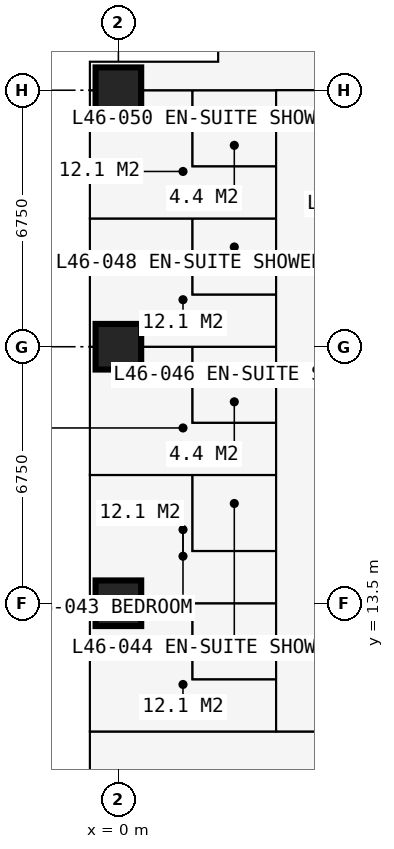
"""IFC4 building model, lengths in metres.
Left out: names, types, materials, properties, quantities, classifications, styles, units other than length and angle.
Written with IfcOpenShell. Run it as: python <this file> out.ifc"""

import sys

from ifc_helpers import new_model, si_unit, direction, frame, frame_2d, origin, origin_2d, place, context, subcontext, project, spatial, rectangle, extrude, element, fill, save


model = new_model("IFC4")
c1 = context("Model", 3, precision=1e-05, world=origin(), true_north=direction((0.0, 1.0)))
c2 = subcontext(c1, "Body", "Model", "MODEL_VIEW")
j1 = project(units=[si_unit("LENGTHUNIT", "METRE"), si_unit("PLANEANGLEUNIT", "RADIAN")], contexts=[c1])
p1 = place(None, origin())
s1 = spatial("IfcSite", under=j1, at=p1, CompositionType="ELEMENT")
p2 = place(p1, origin())
s2 = spatial("IfcBuilding", under=s1, at=p2, CompositionType="ELEMENT")
p3 = place(p2, frame((0.0, 0.0, 171.0)))
s3 = spatial("IfcBuildingStorey", under=s2, at=p3, CompositionType="ELEMENT", Elevation=171.0)
for number, where, z_axis, x_axis in (
    (1, (0.0, 13.5, 0.0), (0.0, 0.0, 1.0), (1.0, 0.0, 0.0)),
    (2, (0.0, 20.25, 0.0), (0.0, 0.0, 1.0), (1.0, 0.0, 0.0)),
    (3, (0.0, 27.0, 0.0), (0.0, 0.0, 1.0), (1.0, 0.0, 0.0)),
):
    element("IfcColumn", number, at=place(p3, frame(where, z_axis=z_axis, x_axis=x_axis)), inside=s3, PredefinedType="COLUMN", context=c2, shape_type="SweptSolid", body=[
        extrude(rectangle(XDim=1.2, YDim=1.2, at=origin_2d()), origin(), (0.0, 0.0, 1.0), 3.6),
    ])
p4 = place(p3, frame((2.625, 31.125, 0.0), z_axis=(0.0, 0.0, 1.0), x_axis=(0.0, -1.0, 0.0)))
e4 = element("IfcWall", 4, at=p4, inside=s3, PredefinedType="SOLIDWALL", context=c2, shape_type="SweptSolid", body=[
    extrude(rectangle(XDim=3.375, YDim=0.3, at=frame_2d((1.688, 0.0))), origin(), (0.0, 0.0, 1.0), 3.375),
])
p5 = place(p4, frame((0.788, 0.0, 0.6)))
e5 = element("IfcOpeningElement", 5, at=p5, cuts=e4, PredefinedType="OPENING", context=c2, shape_type="SweptSolid", body=[
    extrude(rectangle(XDim=1.8, YDim=2.1, at=frame_2d((0.9, 1.05))), frame((0.0, 0.16, 0.0), z_axis=(0.0, -1.0, 0.0), x_axis=(1.0, 0.0, 0.0)), (0.0, 0.0, 1.0), 0.32),
])
p6 = place(p3, frame((2.625, 27.75, 0.0), z_axis=(0.0, 0.0, 1.0), x_axis=(-1.0, 0.0, 0.0)))
e6 = element("IfcWall", 6, at=p6, inside=s3, PredefinedType="SOLIDWALL", context=c2, shape_type="SweptSolid", body=[
    extrude(rectangle(XDim=3.375, YDim=0.3, at=frame_2d((1.688, 0.0))), origin(), (0.0, 0.0, 1.0), 3.375),
])
p7 = place(p6, frame((0.788, 0.0, 0.6)))
e7 = element("IfcOpeningElement", 7, at=p7, cuts=e6, PredefinedType="OPENING", context=c2, shape_type="SweptSolid", body=[
    extrude(rectangle(XDim=1.8, YDim=2.1, at=frame_2d((0.9, 1.05))), frame((0.0, 0.16, 0.0), z_axis=(0.0, -1.0, 0.0), x_axis=(1.0, 0.0, 0.0)), (0.0, 0.0, 1.0), 0.32),
])
p8 = place(p3, frame((-0.75, 13.5, 0.0), z_axis=(0.0, 0.0, 1.0), x_axis=(0.0, 1.0, 0.0)))
e8 = element("IfcWall", 8, at=p8, inside=s3, PredefinedType="SOLIDWALL", context=c2, shape_type="SweptSolid", body=[
    extrude(rectangle(XDim=6.75, YDim=0.15, at=frame_2d((3.375, 0.0))), origin(), (0.0, 0.0, 1.0), 3.375),
])
p9 = place(p8, frame((0.613, 0.0, 0.0)))
e9 = element("IfcOpeningElement", 9, at=p9, cuts=e8, PredefinedType="OPENING", context=c2, shape_type="SweptSolid", body=[
    extrude(rectangle(XDim=1.0, YDim=2.2, at=frame_2d((0.5, 1.1))), frame((0.0, 0.085, 0.0), z_axis=(0.0, -1.0, 0.0), x_axis=(1.0, 0.0, 0.0)), (0.0, 0.0, 1.0), 0.17),
])
p10 = place(p8, frame((1.725, 0.0, 0.9)))
e10 = element("IfcOpeningElement", 10, at=p10, cuts=e8, PredefinedType="OPENING", context=c2, shape_type="SweptSolid", body=[
    extrude(rectangle(XDim=1.2, YDim=1.8, at=frame_2d((0.6, 0.9))), frame((0.0, 0.085, 0.0), z_axis=(0.0, -1.0, 0.0), x_axis=(1.0, 0.0, 0.0)), (0.0, 0.0, 1.0), 0.17),
])
p11 = place(p8, frame((5.137, 0.0, 0.0)))
e11 = element("IfcOpeningElement", 11, at=p11, cuts=e8, PredefinedType="OPENING", context=c2, shape_type="SweptSolid", body=[
    extrude(rectangle(XDim=1.0, YDim=2.2, at=frame_2d((0.5, 1.1))), frame((0.0, 0.085, 0.0), z_axis=(0.0, -1.0, 0.0), x_axis=(1.0, 0.0, 0.0)), (0.0, 0.0, 1.0), 0.17),
])
p12 = place(p8, frame((3.825, 0.0, 0.9)))
e12 = element("IfcOpeningElement", 12, at=p12, cuts=e8, PredefinedType="OPENING", context=c2, shape_type="SweptSolid", body=[
    extrude(rectangle(XDim=1.2, YDim=1.8, at=frame_2d((0.6, 0.9))), frame((0.0, 0.085, 0.0), z_axis=(0.0, -1.0, 0.0), x_axis=(1.0, 0.0, 0.0)), (0.0, 0.0, 1.0), 0.17),
])
p13 = place(p3, frame((-0.85, 16.875, 0.0), z_axis=(0.0, 0.0, 1.0), x_axis=(-1.0, 0.0, 0.0)))
e13 = element("IfcWall", 13, at=p13, inside=s3, PredefinedType="USERDEFINED", context=c2, shape_type="SweptSolid", body=[
    extrude(rectangle(XDim=2.2, YDim=1.0, at=frame_2d((1.1, 0.0))), origin(), (0.0, 0.0, 1.0), 0.9),
])
p14 = place(p3, frame((-0.734, 10.125, 0.0), z_axis=(0.0, 0.0, 1.0), x_axis=(1.0, 0.0, 0.0)))
e14 = element("IfcWall", 14, at=p14, inside=s3, PredefinedType="PARTITIONING", context=c2, shape_type="SweptSolid", body=[
    extrude(rectangle(XDim=10.859, YDim=0.15, at=frame_2d((5.429, 0.0))), origin(), (0.0, 0.0, 1.0), 3.375),
])
p15 = place(p14, frame((8.234, 0.0, 0.0)))
e15 = element("IfcOpeningElement", 15, at=p15, cuts=e14, PredefinedType="OPENING", context=c2, shape_type="SweptSolid", body=[
    extrude(rectangle(XDim=0.95, YDim=2.2, at=frame_2d((0.475, 1.1))), frame((0.0, 0.085, 0.0), z_axis=(0.0, -1.0, 0.0), x_axis=(1.0, 0.0, 0.0)), (0.0, 0.0, 1.0), 0.17),
])
p16 = place(p3, frame((-0.734, 13.5, 0.0), z_axis=(0.0, 0.0, 1.0), x_axis=(1.0, 0.0, 0.0)))
e16 = element("IfcWall", 16, at=p16, inside=s3, PredefinedType="PARTITIONING", context=c2, shape_type="SweptSolid", body=[
    extrude(rectangle(XDim=4.884, YDim=0.175, at=frame_2d((2.442, 0.0))), origin(), (0.0, 0.0, 1.0), 2.877),
])
p17 = place(p3, frame((-0.734, 16.875, 0.0), z_axis=(0.0, 0.0, 1.0), x_axis=(1.0, 0.0, 0.0)))
e17 = element("IfcWall", 17, at=p17, inside=s3, PredefinedType="PARTITIONING", context=c2, shape_type="SweptSolid", body=[
    extrude(rectangle(XDim=4.884, YDim=0.175, at=frame_2d((2.442, 0.0))), origin(), (0.0, 0.0, 1.0), 3.375),
])
p18 = place(p3, frame((-0.734, 20.25, 0.0), z_axis=(0.0, 0.0, 1.0), x_axis=(1.0, 0.0, 0.0)))
e18 = element("IfcWall", 18, at=p18, inside=s3, PredefinedType="PARTITIONING", context=c2, shape_type="SweptSolid", body=[
    extrude(rectangle(XDim=4.884, YDim=0.175, at=frame_2d((2.442, 0.0))), origin(), (0.0, 0.0, 1.0), 2.877),
])
p19 = place(p3, frame((-0.734, 23.625, 0.0), z_axis=(0.0, 0.0, 1.0), x_axis=(1.0, 0.0, 0.0)))
e19 = element("IfcWall", 19, at=p19, inside=s3, PredefinedType="PARTITIONING", context=c2, shape_type="SweptSolid", body=[
    extrude(rectangle(XDim=4.884, YDim=0.175, at=frame_2d((2.442, 0.0))), origin(), (0.0, 0.0, 1.0), 3.375),
])
p20 = place(p3, frame((-0.734, 27.0, 0.0), z_axis=(0.0, 0.0, 1.0), x_axis=(1.0, 0.0, 0.0)))
e20 = element("IfcWall", 20, at=p20, inside=s3, PredefinedType="PARTITIONING", context=c2, shape_type="SweptSolid", body=[
    extrude(rectangle(XDim=12.034, YDim=0.15, at=frame_2d((6.017, 0.0))), origin(), (0.0, 0.0, 1.0), 2.806),
])
p21 = place(p20, frame((8.084, 0.0, 0.0)))
e21 = element("IfcOpeningElement", 21, at=p21, cuts=e20, PredefinedType="OPENING", context=c2, shape_type="SweptSolid", body=[
    extrude(rectangle(XDim=1.0, YDim=2.2, at=frame_2d((0.5, 1.1))), frame((0.0, 0.085, 0.0), z_axis=(0.0, -1.0, 0.0), x_axis=(1.0, 0.0, 0.0)), (0.0, 0.0, 1.0), 0.17),
])
p22 = place(p3, frame((1.95, 11.5, 0.0), z_axis=(0.0, 0.0, 1.0), x_axis=(0.0, 1.0, 0.0)))
e22 = element("IfcWall", 22, at=p22, inside=s3, PredefinedType="PARTITIONING", context=c2, shape_type="SweptSolid", body=[
    extrude(rectangle(XDim=2.0, YDim=0.1, at=frame_2d((1.0, 0.0))), origin(), (0.0, 0.0, 1.0), 3.375),
])
p23 = place(p3, frame((1.95, 11.5, 0.0), z_axis=(0.0, 0.0, 1.0), x_axis=(1.0, 0.0, 0.0)))
e23 = element("IfcWall", 23, at=p23, inside=s3, PredefinedType="PARTITIONING", context=c2, shape_type="SweptSolid", body=[
    extrude(rectangle(XDim=2.2, YDim=0.1, at=frame_2d((1.1, 0.0))), origin(), (0.0, 0.0, 1.0), 3.375),
])
p24 = place(p23, frame((0.65, 0.0, 0.0)))
e24 = element("IfcOpeningElement", 24, at=p24, cuts=e23, PredefinedType="OPENING", context=c2, shape_type="SweptSolid", body=[
    extrude(rectangle(XDim=0.9, YDim=2.2, at=frame_2d((0.45, 1.1))), frame((0.0, 0.06, 0.0), z_axis=(0.0, -1.0, 0.0), x_axis=(1.0, 0.0, 0.0)), (0.0, 0.0, 1.0), 0.12),
])
p25 = place(p3, frame((1.95, 14.875, 0.0), z_axis=(0.0, 0.0, 1.0), x_axis=(0.0, 1.0, 0.0)))
e25 = element("IfcWall", 25, at=p25, inside=s3, PredefinedType="PARTITIONING", context=c2, shape_type="SweptSolid", body=[
    extrude(rectangle(XDim=2.0, YDim=0.1, at=frame_2d((1.0, 0.0))), origin(), (0.0, 0.0, 1.0), 3.375),
])
p26 = place(p3, frame((1.95, 14.875, 0.0), z_axis=(0.0, 0.0, 1.0), x_axis=(1.0, 0.0, 0.0)))
e26 = element("IfcWall", 26, at=p26, inside=s3, PredefinedType="PARTITIONING", context=c2, shape_type="SweptSolid", body=[
    extrude(rectangle(XDim=2.2, YDim=0.1, at=frame_2d((1.1, 0.0))), origin(), (0.0, 0.0, 1.0), 3.375),
])
p27 = place(p26, frame((0.65, 0.0, 0.0)))
e27 = element("IfcOpeningElement", 27, at=p27, cuts=e26, PredefinedType="OPENING", context=c2, shape_type="SweptSolid", body=[
    extrude(rectangle(XDim=0.9, YDim=2.2, at=frame_2d((0.45, 1.1))), frame((0.0, 0.06, 0.0), z_axis=(0.0, -1.0, 0.0), x_axis=(1.0, 0.0, 0.0)), (0.0, 0.0, 1.0), 0.12),
])
p28 = place(p3, frame((1.95, 18.25, 0.0), z_axis=(0.0, 0.0, 1.0), x_axis=(0.0, 1.0, 0.0)))
e28 = element("IfcWall", 28, at=p28, inside=s3, PredefinedType="PARTITIONING", context=c2, shape_type="SweptSolid", body=[
    extrude(rectangle(XDim=2.0, YDim=0.1, at=frame_2d((1.0, 0.0))), origin(), (0.0, 0.0, 1.0), 3.375),
])
p29 = place(p3, frame((1.95, 18.25, 0.0), z_axis=(0.0, 0.0, 1.0), x_axis=(1.0, 0.0, 0.0)))
e29 = element("IfcWall", 29, at=p29, inside=s3, PredefinedType="PARTITIONING", context=c2, shape_type="SweptSolid", body=[
    extrude(rectangle(XDim=2.2, YDim=0.1, at=frame_2d((1.1, 0.0))), origin(), (0.0, 0.0, 1.0), 3.375),
])
p30 = place(p29, frame((0.65, 0.0, 0.0)))
e30 = element("IfcOpeningElement", 30, at=p30, cuts=e29, PredefinedType="OPENING", context=c2, shape_type="SweptSolid", body=[
    extrude(rectangle(XDim=0.9, YDim=2.2, at=frame_2d((0.45, 1.1))), frame((0.0, 0.06, 0.0), z_axis=(0.0, -1.0, 0.0), x_axis=(1.0, 0.0, 0.0)), (0.0, 0.0, 1.0), 0.12),
])
p31 = place(p3, frame((1.95, 21.625, 0.0), z_axis=(0.0, 0.0, 1.0), x_axis=(0.0, 1.0, 0.0)))
e31 = element("IfcWall", 31, at=p31, inside=s3, PredefinedType="PARTITIONING", context=c2, shape_type="SweptSolid", body=[
    extrude(rectangle(XDim=2.0, YDim=0.1, at=frame_2d((1.0, 0.0))), origin(), (0.0, 0.0, 1.0), 3.375),
])
p32 = place(p3, frame((1.95, 21.625, 0.0), z_axis=(0.0, 0.0, 1.0), x_axis=(1.0, 0.0, 0.0)))
e32 = element("IfcWall", 32, at=p32, inside=s3, PredefinedType="PARTITIONING", context=c2, shape_type="SweptSolid", body=[
    extrude(rectangle(XDim=2.2, YDim=0.1, at=frame_2d((1.1, 0.0))), origin(), (0.0, 0.0, 1.0), 3.375),
])
p33 = place(p32, frame((0.65, 0.0, 0.0)))
e33 = element("IfcOpeningElement", 33, at=p33, cuts=e32, PredefinedType="OPENING", context=c2, shape_type="SweptSolid", body=[
    extrude(rectangle(XDim=0.9, YDim=2.2, at=frame_2d((0.45, 1.1))), frame((0.0, 0.06, 0.0), z_axis=(0.0, -1.0, 0.0), x_axis=(1.0, 0.0, 0.0)), (0.0, 0.0, 1.0), 0.12),
])
p34 = place(p3, frame((1.95, 25.0, 0.0), z_axis=(0.0, 0.0, 1.0), x_axis=(0.0, 1.0, 0.0)))
e34 = element("IfcWall", 34, at=p34, inside=s3, PredefinedType="PARTITIONING", context=c2, shape_type="SweptSolid", body=[
    extrude(rectangle(XDim=2.0, YDim=0.1, at=frame_2d((1.0, 0.0))), origin(), (0.0, 0.0, 1.0), 3.375),
])
p35 = place(p3, frame((1.95, 25.0, 0.0), z_axis=(0.0, 0.0, 1.0), x_axis=(1.0, 0.0, 0.0)))
e35 = element("IfcWall", 35, at=p35, inside=s3, PredefinedType="PARTITIONING", context=c2, shape_type="SweptSolid", body=[
    extrude(rectangle(XDim=2.2, YDim=0.1, at=frame_2d((1.1, 0.0))), origin(), (0.0, 0.0, 1.0), 3.375),
])
p36 = place(p35, frame((0.65, 0.0, 0.0)))
e36 = element("IfcOpeningElement", 36, at=p36, cuts=e35, PredefinedType="OPENING", context=c2, shape_type="SweptSolid", body=[
    extrude(rectangle(XDim=0.9, YDim=2.2, at=frame_2d((0.45, 1.1))), frame((0.0, 0.06, 0.0), z_axis=(0.0, -1.0, 0.0), x_axis=(1.0, 0.0, 0.0)), (0.0, 0.0, 1.0), 0.12),
])
p37 = place(p3, frame((4.15, 10.125, 0.0), z_axis=(0.0, 0.0, 1.0), x_axis=(0.0, 1.0, 0.0)))
e37 = element("IfcWall", 37, at=p37, inside=s3, PredefinedType="PARTITIONING", context=c2, shape_type="SweptSolid", body=[
    extrude(rectangle(XDim=16.875, YDim=0.1, at=frame_2d((8.438, 0.0))), origin(), (0.0, 0.0, 1.0), 3.375),
])
p38 = place(p37, frame((0.2, 0.0, 0.0)))
e38 = element("IfcOpeningElement", 38, at=p38, cuts=e37, PredefinedType="OPENING", context=c2, shape_type="SweptSolid", body=[
    extrude(rectangle(XDim=0.95, YDim=2.2, at=frame_2d((0.475, 1.1))), frame((0.0, 0.06, 0.0), z_axis=(0.0, -1.0, 0.0), x_axis=(1.0, 0.0, 0.0)), (0.0, 0.0, 1.0), 0.12),
])
p39 = place(p37, frame((3.625, 0.0, 0.0)))
e39 = element("IfcOpeningElement", 39, at=p39, cuts=e37, PredefinedType="OPENING", context=c2, shape_type="SweptSolid", body=[
    extrude(rectangle(XDim=0.95, YDim=2.2, at=frame_2d((0.475, 1.1))), frame((0.0, 0.06, 0.0), z_axis=(0.0, -1.0, 0.0), x_axis=(1.0, 0.0, 0.0)), (0.0, 0.0, 1.0), 0.12),
])
p40 = place(p37, frame((7.0, 0.0, 0.0)))
e40 = element("IfcOpeningElement", 40, at=p40, cuts=e37, PredefinedType="OPENING", context=c2, shape_type="SweptSolid", body=[
    extrude(rectangle(XDim=0.95, YDim=2.2, at=frame_2d((0.475, 1.1))), frame((0.0, 0.06, 0.0), z_axis=(0.0, -1.0, 0.0), x_axis=(1.0, 0.0, 0.0)), (0.0, 0.0, 1.0), 0.12),
])
p41 = place(p37, frame((10.375, 0.0, 0.0)))
e41 = element("IfcOpeningElement", 41, at=p41, cuts=e37, PredefinedType="OPENING", context=c2, shape_type="SweptSolid", body=[
    extrude(rectangle(XDim=0.95, YDim=2.2, at=frame_2d((0.475, 1.1))), frame((0.0, 0.06, 0.0), z_axis=(0.0, -1.0, 0.0), x_axis=(1.0, 0.0, 0.0)), (0.0, 0.0, 1.0), 0.12),
])
p42 = place(p37, frame((13.75, 0.0, 0.0)))
e42 = element("IfcOpeningElement", 42, at=p42, cuts=e37, PredefinedType="OPENING", context=c2, shape_type="SweptSolid", body=[
    extrude(rectangle(XDim=0.95, YDim=2.2, at=frame_2d((0.475, 1.1))), frame((0.0, 0.06, 0.0), z_axis=(0.0, -1.0, 0.0), x_axis=(1.0, 0.0, 0.0)), (0.0, 0.0, 1.0), 0.12),
])
p43 = place(p7, origin())
e43 = element("IfcWindow", 43, at=p43, inside=s3, PartitioningType="SINGLE_PANEL", PredefinedType="WINDOW", context=c2, shape_type="SweptSolid", body=[
    extrude(rectangle(XDim=1.8, YDim=2.1, at=frame_2d((0.9, 1.05))), frame((0.0, 0.03, 0.0), z_axis=(0.0, -1.0, 0.0), x_axis=(1.0, 0.0, 0.0)), (0.0, 0.0, 1.0), 0.06),
])
fill(e7, e43)
p44 = place(p9, origin())
e44 = element("IfcDoor", 44, at=p44, inside=s3, OperationType="SINGLE_SWING_LEFT", PredefinedType="DOOR", context=c2, shape_type="SweptSolid", body=[
    extrude(rectangle(XDim=1.0, YDim=2.2, at=frame_2d((0.5, 1.1))), frame((0.0, 0.025, 0.0), z_axis=(0.0, -1.0, 0.0), x_axis=(1.0, 0.0, 0.0)), (0.0, 0.0, 1.0), 0.05),
])
fill(e9, e44)
p45 = place(p10, origin())
e45 = element("IfcWindow", 45, at=p45, inside=s3, PartitioningType="SINGLE_PANEL", PredefinedType="WINDOW", context=c2, shape_type="SweptSolid", body=[
    extrude(rectangle(XDim=1.2, YDim=1.8, at=frame_2d((0.6, 0.9))), frame((0.0, 0.03, 0.0), z_axis=(0.0, -1.0, 0.0), x_axis=(1.0, 0.0, 0.0)), (0.0, 0.0, 1.0), 0.06),
])
fill(e10, e45)
p46 = place(p11, origin())
e46 = element("IfcDoor", 46, at=p46, inside=s3, OperationType="SINGLE_SWING_RIGHT", PredefinedType="DOOR", context=c2, shape_type="SweptSolid", body=[
    extrude(rectangle(XDim=1.0, YDim=2.2, at=frame_2d((0.5, 1.1))), frame((0.0, 0.025, 0.0), z_axis=(0.0, -1.0, 0.0), x_axis=(1.0, 0.0, 0.0)), (0.0, 0.0, 1.0), 0.05),
])
fill(e11, e46)
p47 = place(p12, origin())
e47 = element("IfcWindow", 47, at=p47, inside=s3, PartitioningType="SINGLE_PANEL", PredefinedType="WINDOW", context=c2, shape_type="SweptSolid", body=[
    extrude(rectangle(XDim=1.2, YDim=1.8, at=frame_2d((0.6, 0.9))), frame((0.0, 0.03, 0.0), z_axis=(0.0, -1.0, 0.0), x_axis=(1.0, 0.0, 0.0)), (0.0, 0.0, 1.0), 0.06),
])
fill(e12, e47)
p48 = place(p38, origin())
e48 = element("IfcDoor", 48, at=p48, inside=s3, OperationType="SINGLE_SWING_LEFT", PredefinedType="DOOR", context=c2, shape_type="SweptSolid", body=[
    extrude(rectangle(XDim=0.95, YDim=2.2, at=frame_2d((0.475, 1.1))), frame((0.0, 0.025, 0.0), z_axis=(0.0, -1.0, 0.0), x_axis=(1.0, 0.0, 0.0)), (0.0, 0.0, 1.0), 0.05),
])
fill(e38, e48)
p49 = place(p24, origin())
e49 = element("IfcDoor", 49, at=p49, inside=s3, OperationType="SINGLE_SWING_RIGHT", PredefinedType="DOOR", context=c2, shape_type="SweptSolid", body=[
    extrude(rectangle(XDim=0.9, YDim=2.2, at=frame_2d((0.45, 1.1))), frame((0.0, 0.025, 0.0), z_axis=(0.0, -1.0, 0.0), x_axis=(1.0, 0.0, 0.0)), (0.0, 0.0, 1.0), 0.05),
])
fill(e24, e49)
p50 = place(p39, origin())
e50 = element("IfcDoor", 50, at=p50, inside=s3, OperationType="SINGLE_SWING_LEFT", PredefinedType="DOOR", context=c2, shape_type="SweptSolid", body=[
    extrude(rectangle(XDim=0.95, YDim=2.2, at=frame_2d((0.475, 1.1))), frame((0.0, 0.025, 0.0), z_axis=(0.0, -1.0, 0.0), x_axis=(1.0, 0.0, 0.0)), (0.0, 0.0, 1.0), 0.05),
])
fill(e39, e50)
p51 = place(p27, origin())
e51 = element("IfcDoor", 51, at=p51, inside=s3, OperationType="SINGLE_SWING_RIGHT", PredefinedType="DOOR", context=c2, shape_type="SweptSolid", body=[
    extrude(rectangle(XDim=0.9, YDim=2.2, at=frame_2d((0.45, 1.1))), frame((0.0, 0.025, 0.0), z_axis=(0.0, -1.0, 0.0), x_axis=(1.0, 0.0, 0.0)), (0.0, 0.0, 1.0), 0.05),
])
fill(e27, e51)
p52 = place(p40, origin())
e52 = element("IfcDoor", 52, at=p52, inside=s3, OperationType="SINGLE_SWING_LEFT", PredefinedType="DOOR", context=c2, shape_type="SweptSolid", body=[
    extrude(rectangle(XDim=0.95, YDim=2.2, at=frame_2d((0.475, 1.1))), frame((0.0, 0.025, 0.0), z_axis=(0.0, -1.0, 0.0), x_axis=(1.0, 0.0, 0.0)), (0.0, 0.0, 1.0), 0.05),
])
fill(e40, e52)
p53 = place(p30, origin())
e53 = element("IfcDoor", 53, at=p53, inside=s3, OperationType="SINGLE_SWING_RIGHT", PredefinedType="DOOR", context=c2, shape_type="SweptSolid", body=[
    extrude(rectangle(XDim=0.9, YDim=2.2, at=frame_2d((0.45, 1.1))), frame((0.0, 0.025, 0.0), z_axis=(0.0, -1.0, 0.0), x_axis=(1.0, 0.0, 0.0)), (0.0, 0.0, 1.0), 0.05),
])
fill(e30, e53)
p54 = place(p41, origin())
e54 = element("IfcDoor", 54, at=p54, inside=s3, OperationType="SINGLE_SWING_LEFT", PredefinedType="DOOR", context=c2, shape_type="SweptSolid", body=[
    extrude(rectangle(XDim=0.95, YDim=2.2, at=frame_2d((0.475, 1.1))), frame((0.0, 0.025, 0.0), z_axis=(0.0, -1.0, 0.0), x_axis=(1.0, 0.0, 0.0)), (0.0, 0.0, 1.0), 0.05),
])
fill(e41, e54)
p55 = place(p33, origin())
e55 = element("IfcDoor", 55, at=p55, inside=s3, OperationType="SINGLE_SWING_RIGHT", PredefinedType="DOOR", context=c2, shape_type="SweptSolid", body=[
    extrude(rectangle(XDim=0.9, YDim=2.2, at=frame_2d((0.45, 1.1))), frame((0.0, 0.025, 0.0), z_axis=(0.0, -1.0, 0.0), x_axis=(1.0, 0.0, 0.0)), (0.0, 0.0, 1.0), 0.05),
])
fill(e33, e55)
p56 = place(p42, origin())
e56 = element("IfcDoor", 56, at=p56, inside=s3, OperationType="SINGLE_SWING_LEFT", PredefinedType="DOOR", context=c2, shape_type="SweptSolid", body=[
    extrude(rectangle(XDim=0.95, YDim=2.2, at=frame_2d((0.475, 1.1))), frame((0.0, 0.025, 0.0), z_axis=(0.0, -1.0, 0.0), x_axis=(1.0, 0.0, 0.0)), (0.0, 0.0, 1.0), 0.05),
])
fill(e42, e56)
p57 = place(p36, origin())
e57 = element("IfcDoor", 57, at=p57, inside=s3, OperationType="SINGLE_SWING_RIGHT", PredefinedType="DOOR", context=c2, shape_type="SweptSolid", body=[
    extrude(rectangle(XDim=0.9, YDim=2.2, at=frame_2d((0.45, 1.1))), frame((0.0, 0.025, 0.0), z_axis=(0.0, -1.0, 0.0), x_axis=(1.0, 0.0, 0.0)), (0.0, 0.0, 1.0), 0.05),
])
fill(e36, e57)
save(model, sys.argv[1])
